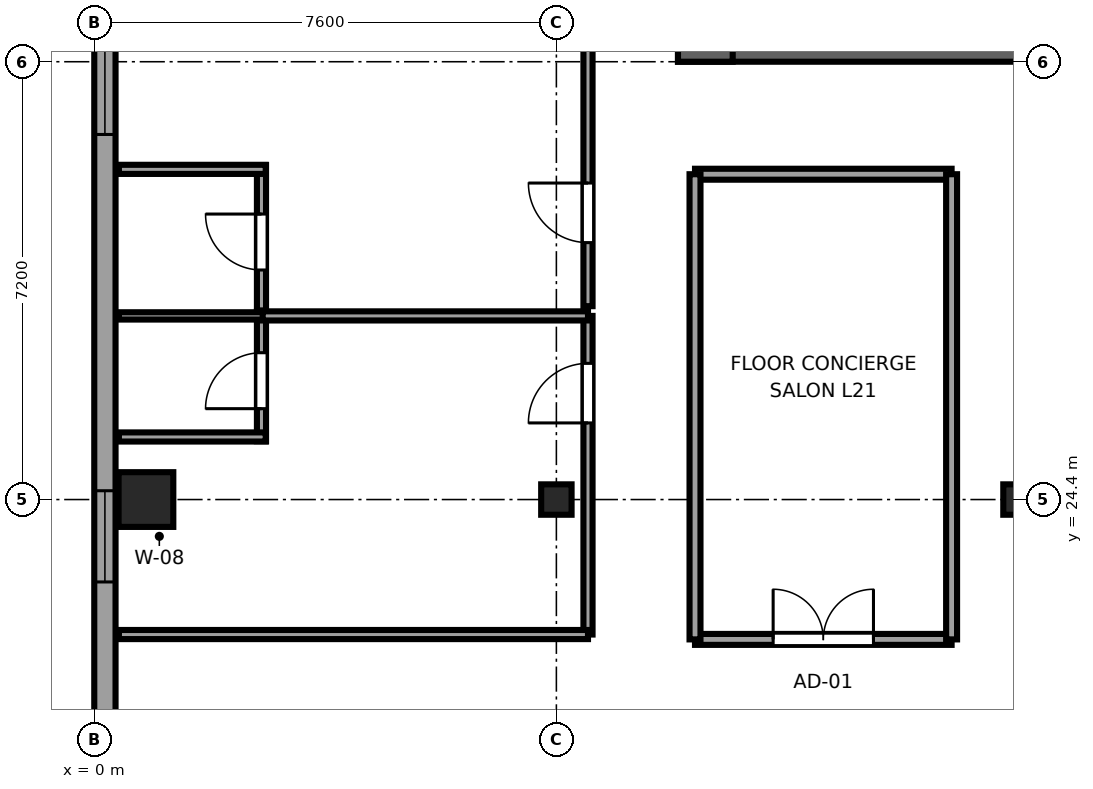
"""IFC4 building model, lengths in metres.
Left out: names, types, materials, properties, quantities, classifications, styles, units other than length and angle.
Written with IfcOpenShell. Run it as: python <this file> out.ifc"""

import sys

from ifc_helpers import new_model, si_unit, direction, frame, frame_2d, origin, origin_2d, place, context, subcontext, project, spatial, rectangle, i_section, extrude, source, transform, mapped, element, fill, save


model = new_model("IFC4")
c1 = context("Model", 3, precision=1e-05, world=origin(), true_north=direction((0.0, 1.0)))
c2 = subcontext(c1, "Body", "Model", "MODEL_VIEW")
j1 = project(units=[si_unit("LENGTHUNIT", "METRE"), si_unit("PLANEANGLEUNIT", "RADIAN")], contexts=[c1])
p1 = place(None, origin())
s1 = spatial("IfcSite", under=j1, at=p1, CompositionType="ELEMENT")
p2 = place(p1, origin())
s2 = spatial("IfcBuilding", under=s1, at=p2, CompositionType="ELEMENT")
p3 = place(p2, frame((0.0, 0.0, 85.25)))
s3 = spatial("IfcBuildingStorey", under=s2, at=p3, CompositionType="ELEMENT", Elevation=85.25)
p4 = place(p3, frame((9.6, 32.05, 0.0), z_axis=(0.0, 0.0, 1.0), x_axis=(1.0, 0.0, 0.0)))
e1 = element("IfcWall", 1, at=p4, inside=s3, PredefinedType="SHEAR", context=c2, shape_type="SweptSolid", body=[
    extrude(rectangle(XDim=26.8, YDim=0.9, at=frame_2d((13.4, 0.0))), origin(), (0.0, 0.0, 1.0), 3.55),
])
p5 = place(p4, frame((7.85, 0.0, 0.0), z_axis=(0.0, 0.0, 1.0), x_axis=(-1.0, 0.0, 0.0)))
e2 = element("IfcOpeningElement", 2, at=p5, cuts=e1, PredefinedType="OPENING", context=c2, shape_type="SweptSolid", body=[
    extrude(rectangle(XDim=1.5, YDim=2.04, at=frame_2d((0.75, 1.02))), frame((0.0, 0.46, 0.0), z_axis=(0.0, -1.0, 0.0), x_axis=(1.0, 0.0, 0.0)), (0.0, 0.0, 1.0), 0.92),
])
p6 = place(p4, frame((14.15, 0.0, 0.0), z_axis=(0.0, 0.0, 1.0), x_axis=(-1.0, 0.0, 0.0)))
e3 = element("IfcOpeningElement", 3, at=p6, cuts=e1, PredefinedType="OPENING", context=c2, shape_type="SweptSolid", body=[
    extrude(rectangle(XDim=1.5, YDim=2.04, at=frame_2d((0.75, 1.02))), frame((0.0, 0.46, 0.0), z_axis=(0.0, -1.0, 0.0), x_axis=(1.0, 0.0, 0.0)), (0.0, 0.0, 1.0), 0.92),
])
p7 = place(p4, frame((20.45, 0.0, 0.0), z_axis=(0.0, 0.0, 1.0), x_axis=(-1.0, 0.0, 0.0)))
e4 = element("IfcOpeningElement", 4, at=p7, cuts=e1, PredefinedType="OPENING", context=c2, shape_type="SweptSolid", body=[
    extrude(rectangle(XDim=1.5, YDim=2.04, at=frame_2d((0.75, 1.02))), frame((0.0, 0.46, 0.0), z_axis=(0.0, -1.0, 0.0), x_axis=(1.0, 0.0, 0.0)), (0.0, 0.0, 1.0), 0.92),
])
p8 = place(p3, frame((10.05, 31.6, 0.0), z_axis=(0.0, 0.0, 1.0), x_axis=(0.0, 1.0, 0.0)))
e5 = element("IfcWall", 5, at=p8, inside=s3, PredefinedType="SHEAR", context=c2, shape_type="SweptSolid", body=[
    extrude(rectangle(XDim=13.6, YDim=0.9, at=frame_2d((6.8, 0.0))), origin(), (0.0, 0.0, 1.0), 3.55),
])
m1 = source(origin(), c2, "Body", "SweptSolid", [
    extrude(rectangle(XDim=0.9, YDim=0.9, at=origin_2d()), origin(), (0.0, 0.0, 1.0), 3.55),
])
p9 = place(p3, frame((0.85, 24.4, 0.0), z_axis=(0.0, 0.0, 1.0), x_axis=(1.0, 0.0, 0.0)))
e6 = element("IfcColumn", 6, at=p9, inside=s3, PredefinedType="COLUMN", context=c2, shape_type="MappedRepresentation", body=[
    mapped(m1, transform((0.0, 0.0, 0.0), x_axis=(1.0, 0.0, 0.0), y_axis=(0.0, 1.0, 0.0), z_axis=(0.0, 0.0, 1.0), scale=1.0)),
])
m2 = source(origin(), c2, "Body", "SweptSolid", [
    extrude(i_section(OverallWidth=0.5, OverallDepth=0.5, WebThickness=0.022, FlangeThickness=0.034, at=origin_2d()), origin(), (0.0, 0.0, 1.0), 3.55),
])
for number, where, z_axis, x_axis in (
    (7, (7.6, 24.4, 0.0), (0.0, 0.0, 1.0), (1.0, 0.0, 0.0)),
    (8, (15.2, 24.4, 0.0), (0.0, 0.0, 1.0), (1.0, 0.0, 0.0)),
):
    element("IfcColumn", number, at=place(p3, frame(where, z_axis=z_axis, x_axis=x_axis)), inside=s3, PredefinedType="COLUMN", context=c2, shape_type="MappedRepresentation", body=[
        mapped(m2, transform((0.0, 0.0, 0.0), x_axis=(1.0, 0.0, 0.0), y_axis=(0.0, 1.0, 0.0), z_axis=(0.0, 0.0, 1.0), scale=1.0)),
    ])
p10 = place(p3, frame((0.175, 41.383, 0.0), z_axis=(0.0, 0.0, 1.0), x_axis=(0.0, -1.0, 0.0)))
e9 = element("IfcWall", 9, at=p10, inside=s3, PredefinedType="SOLIDWALL", context=c2, shape_type="SweptSolid", body=[
    extrude(rectangle(XDim=36.766, YDim=0.35, at=frame_2d((18.383, 0.0))), origin(), (0.0, 0.0, 1.0), 3.37),
])
p11 = place(p10, frame((1.526, 0.0, 0.68)))
e10 = element("IfcOpeningElement", 10, at=p11, cuts=e9, PredefinedType="OPENING", context=c2, shape_type="SweptSolid", body=[
    extrude(rectangle(XDim=2.1, YDim=1.9, at=frame_2d((1.05, 0.95))), frame((0.0, 0.185, 0.0), z_axis=(0.0, -1.0, 0.0), x_axis=(1.0, 0.0, 0.0)), (0.0, 0.0, 1.0), 0.37),
])
p12 = place(p10, frame((4.428, 0.0, 0.68)))
e11 = element("IfcOpeningElement", 11, at=p12, cuts=e9, PredefinedType="OPENING", context=c2, shape_type="SweptSolid", body=[
    extrude(rectangle(XDim=2.1, YDim=1.9, at=frame_2d((1.05, 0.95))), frame((0.0, 0.185, 0.0), z_axis=(0.0, -1.0, 0.0), x_axis=(1.0, 0.0, 0.0)), (0.0, 0.0, 1.0), 0.37),
])
p13 = place(p10, frame((8.879, 0.0, 0.68)))
e12 = element("IfcOpeningElement", 12, at=p13, cuts=e9, PredefinedType="OPENING", context=c2, shape_type="SweptSolid", body=[
    extrude(rectangle(XDim=2.1, YDim=1.9, at=frame_2d((1.05, 0.95))), frame((0.0, 0.185, 0.0), z_axis=(0.0, -1.0, 0.0), x_axis=(1.0, 0.0, 0.0)), (0.0, 0.0, 1.0), 0.37),
])
p14 = place(p10, frame((21.835, 0.0, 0.68)))
e13 = element("IfcOpeningElement", 13, at=p14, cuts=e9, PredefinedType="OPENING", context=c2, shape_type="SweptSolid", body=[
    extrude(rectangle(XDim=2.1, YDim=1.9, at=frame_2d((1.05, 0.95))), frame((0.0, 0.185, 0.0), z_axis=(0.0, -1.0, 0.0), x_axis=(1.0, 0.0, 0.0)), (0.0, 0.0, 1.0), 0.37),
])
p15 = place(p10, frame((26.286, 0.0, 0.68)))
e14 = element("IfcOpeningElement", 14, at=p15, cuts=e9, PredefinedType="OPENING", context=c2, shape_type="SweptSolid", body=[
    extrude(rectangle(XDim=2.1, YDim=1.9, at=frame_2d((1.05, 0.95))), frame((0.0, 0.185, 0.0), z_axis=(0.0, -1.0, 0.0), x_axis=(1.0, 0.0, 0.0)), (0.0, 0.0, 1.0), 0.37),
])
p16 = place(p10, frame((29.738, 0.0, 0.68)))
e15 = element("IfcOpeningElement", 15, at=p16, cuts=e9, PredefinedType="OPENING", context=c2, shape_type="SweptSolid", body=[
    extrude(rectangle(XDim=2.1, YDim=1.9, at=frame_2d((1.05, 0.95))), frame((0.0, 0.185, 0.0), z_axis=(0.0, -1.0, 0.0), x_axis=(1.0, 0.0, 0.0)), (0.0, 0.0, 1.0), 0.37),
])
p17 = place(p10, frame((34.079, 0.0, 0.62)))
e16 = element("IfcOpeningElement", 16, at=p17, cuts=e9, PredefinedType="OPENING", context=c2, shape_type="SweptSolid", body=[
    extrude(rectangle(XDim=1.5, YDim=1.55, at=frame_2d((0.75, 0.775))), frame((0.0, 0.185, 0.0), z_axis=(0.0, -1.0, 0.0), x_axis=(1.0, 0.0, 0.0)), (0.0, 0.0, 1.0), 0.37),
])
p18 = place(p10, frame((16.838, 0.0, 0.62)))
e17 = element("IfcOpeningElement", 17, at=p18, cuts=e9, PredefinedType="OPENING", context=c2, shape_type="SweptSolid", body=[
    extrude(rectangle(XDim=1.5, YDim=1.55, at=frame_2d((0.75, 0.775))), frame((0.0, 0.185, 0.0), z_axis=(0.0, -1.0, 0.0), x_axis=(1.0, 0.0, 0.0)), (0.0, 0.0, 1.0), 0.37),
])
p19 = place(p3, frame((2.75, 25.359, 0.0), z_axis=(0.0, 0.0, 1.0), x_axis=(0.0, 1.0, 0.0)))
e18 = element("IfcWall", 18, at=p19, inside=s3, PredefinedType="PARTITIONING", context=c2, shape_type="SweptSolid", body=[
    extrude(rectangle(XDim=2.131, YDim=0.15, at=frame_2d((1.065, 0.0))), origin(), (0.0, 0.0, 1.0), 3.37),
])
p20 = place(p19, frame((0.535, 0.0, 0.0)))
e19 = element("IfcOpeningElement", 19, at=p20, cuts=e18, PredefinedType="OPENING", context=c2, shape_type="SweptSolid", body=[
    extrude(rectangle(XDim=0.92, YDim=2.01, at=frame_2d((0.46, 1.005))), frame((0.0, 0.085, 0.0), z_axis=(0.0, -1.0, 0.0), x_axis=(1.0, 0.0, 0.0)), (0.0, 0.0, 1.0), 0.17),
])
p21 = place(p3, frame((0.405, 25.429, 0.0), z_axis=(0.0, 0.0, 1.0), x_axis=(1.0, 0.0, 0.0)))
e20 = element("IfcWall", 20, at=p21, inside=s3, PredefinedType="PARTITIONING", context=c2, shape_type="SweptSolid", body=[
    extrude(rectangle(XDim=2.415, YDim=0.15, at=frame_2d((1.208, 0.0))), origin(), (0.0, 0.0, 1.0), 3.37),
])
p22 = place(p3, frame((0.405, 27.42, 0.0), z_axis=(0.0, 0.0, 1.0), x_axis=(1.0, 0.0, 0.0)))
e21 = element("IfcWall", 21, at=p22, inside=s3, PredefinedType="PLUMBINGWALL", context=c2, shape_type="SweptSolid", body=[
    extrude(rectangle(XDim=2.415, YDim=0.12, at=frame_2d((1.208, 0.0))), origin(), (0.0, 0.0, 1.0), 3.37),
])
p23 = place(p3, frame((2.75, 27.51, 0.0), z_axis=(0.0, 0.0, 1.0), x_axis=(0.0, 1.0, 0.0)))
e22 = element("IfcWall", 22, at=p23, inside=s3, PredefinedType="PARTITIONING", context=c2, shape_type="SweptSolid", body=[
    extrude(rectangle(XDim=2.39, YDim=0.15, at=frame_2d((1.195, 0.0))), origin(), (0.0, 0.0, 1.0), 3.37),
])
p24 = place(p23, frame((0.665, 0.0, 0.0)))
e23 = element("IfcOpeningElement", 23, at=p24, cuts=e22, PredefinedType="OPENING", context=c2, shape_type="SweptSolid", body=[
    extrude(rectangle(XDim=0.92, YDim=2.01, at=frame_2d((0.46, 1.005))), frame((0.0, 0.085, 0.0), z_axis=(0.0, -1.0, 0.0), x_axis=(1.0, 0.0, 0.0)), (0.0, 0.0, 1.0), 0.17),
])
p25 = place(p3, frame((0.405, 29.83, 0.0), z_axis=(0.0, 0.0, 1.0), x_axis=(1.0, 0.0, 0.0)))
e24 = element("IfcWall", 24, at=p25, inside=s3, PredefinedType="PARTITIONING", context=c2, shape_type="SweptSolid", body=[
    extrude(rectangle(XDim=2.415, YDim=0.15, at=frame_2d((1.208, 0.0))), origin(), (0.0, 0.0, 1.0), 3.37),
])
p26 = place(p3, frame((8.12, 22.18, 0.0), z_axis=(0.0, 0.0, 1.0), x_axis=(0.0, 1.0, 0.0)))
e25 = element("IfcWall", 25, at=p26, inside=s3, PredefinedType="PARTITIONING", context=c2, shape_type="SweptSolid", body=[
    extrude(rectangle(XDim=5.24, YDim=0.15, at=frame_2d((2.62, 0.0))), origin(), (0.0, 0.0, 1.0), 3.37),
])
p27 = place(p26, frame((3.48, 0.0, 0.0)))
e26 = element("IfcOpeningElement", 26, at=p27, cuts=e25, PredefinedType="OPENING", context=c2, shape_type="SweptSolid", body=[
    extrude(rectangle(XDim=0.98, YDim=2.12, at=frame_2d((0.49, 1.06))), frame((0.0, 0.085, 0.0), z_axis=(0.0, -1.0, 0.0), x_axis=(1.0, 0.0, 0.0)), (0.0, 0.0, 1.0), 0.17),
])
p28 = place(p3, frame((0.405, 22.18, 0.0), z_axis=(0.0, 0.0, 1.0), x_axis=(1.0, 0.0, 0.0)))
e27 = element("IfcWall", 27, at=p28, inside=s3, PredefinedType="PARTITIONING", context=c2, shape_type="SweptSolid", body=[
    extrude(rectangle(XDim=7.715, YDim=0.15, at=frame_2d((3.857, 0.0))), origin(), (0.0, 0.0, 1.0), 3.37),
])
p29 = place(p3, frame((2.77, 27.42, 0.0), z_axis=(0.0, 0.0, 1.0), x_axis=(1.0, 0.0, 0.0)))
e28 = element("IfcWall", 28, at=p29, inside=s3, PredefinedType="PARTITIONING", context=c2, shape_type="SweptSolid", body=[
    extrude(rectangle(XDim=5.35, YDim=0.15, at=frame_2d((2.675, 0.0))), origin(), (0.0, 0.0, 1.0), 3.37),
])
p30 = place(p3, frame((8.12, 27.58, 0.0), z_axis=(0.0, 0.0, 1.0), x_axis=(0.0, 1.0, 0.0)))
e29 = element("IfcWall", 29, at=p30, inside=s3, PredefinedType="PARTITIONING", context=c2, shape_type="SweptSolid", body=[
    extrude(rectangle(XDim=18.015, YDim=0.15, at=frame_2d((9.007, 0.0))), origin(), (0.0, 0.0, 1.0), 3.37),
])
p31 = place(p30, frame((1.045, 0.0, 0.0)))
e30 = element("IfcOpeningElement", 30, at=p31, cuts=e29, PredefinedType="OPENING", context=c2, shape_type="SweptSolid", body=[
    extrude(rectangle(XDim=0.98, YDim=2.12, at=frame_2d((0.49, 1.06))), frame((0.0, 0.085, 0.0), z_axis=(0.0, -1.0, 0.0), x_axis=(1.0, 0.0, 0.0)), (0.0, 0.0, 1.0), 0.17),
])
p32 = place(p3, frame((9.88, 22.1, 0.0), z_axis=(0.0, 0.0, 1.0), x_axis=(1.0, 0.0, 0.0)))
e31 = element("IfcWall", 31, at=p32, inside=s3, PredefinedType="PARTITIONING", context=c2, shape_type="SweptSolid", body=[
    extrude(rectangle(XDim=4.22, YDim=0.18, at=frame_2d((2.11, 0.0))), origin(), (0.0, 0.0, 1.0), 3.37),
])
p33 = place(p32, frame((1.285, 0.0, 0.0)))
e32 = element("IfcOpeningElement", 32, at=p33, cuts=e31, PredefinedType="OPENING", context=c2, shape_type="SweptSolid", body=[
    extrude(rectangle(XDim=1.65, YDim=2.15, at=frame_2d((0.825, 1.075))), frame((0.0, 0.1, 0.0), z_axis=(0.0, -1.0, 0.0), x_axis=(1.0, 0.0, 0.0)), (0.0, 0.0, 1.0), 0.2),
])
p34 = place(p3, frame((9.88, 29.75, 0.0), z_axis=(0.0, 0.0, 1.0), x_axis=(1.0, 0.0, 0.0)))
e33 = element("IfcWall", 33, at=p34, inside=s3, PredefinedType="PARTITIONING", context=c2, shape_type="SweptSolid", body=[
    extrude(rectangle(XDim=4.22, YDim=0.18, at=frame_2d((2.11, 0.0))), origin(), (0.0, 0.0, 1.0), 3.37),
])
for number, where, z_axis, x_axis in (
    (34, (9.88, 22.1, 0.0), (0.0, 0.0, 1.0), (0.0, 1.0, 0.0)),
    (35, (14.1, 22.1, 0.0), (0.0, 0.0, 1.0), (0.0, 1.0, 0.0)),
):
    element("IfcWall", number, at=place(p3, frame(where, z_axis=z_axis, x_axis=x_axis)), inside=s3, PredefinedType="PARTITIONING", context=c2, shape_type="SweptSolid", body=[
        extrude(rectangle(XDim=7.65, YDim=0.18, at=frame_2d((3.825, 0.0))), origin(), (0.0, 0.0, 1.0), 3.37),
    ])
m3 = source(origin(), c2, "Body", "SweptSolid", [
    extrude(rectangle(XDim=2.1, YDim=1.9, at=frame_2d((1.05, 0.95))), frame((0.0, 0.09, 0.0), z_axis=(0.0, -1.0, 0.0), x_axis=(1.0, 0.0, 0.0)), (0.0, 0.0, 1.0), 0.06),
])
p35 = place(p13, origin())
e36 = element("IfcWindow", 36, at=p35, inside=s3, PartitioningType="TRIPLE_PANEL_HORIZONTAL", PredefinedType="WINDOW", context=c2, shape_type="MappedRepresentation", body=[
    mapped(m3, transform((0.0, 0.0, 0.0), x_axis=(1.0, 0.0, 0.0), y_axis=(0.0, 1.0, 0.0), z_axis=(0.0, 0.0, 1.0), scale=1.0)),
])
fill(e12, e36)
m4 = source(origin(), c2, "Body", "SweptSolid", [
    extrude(rectangle(XDim=1.5, YDim=1.55, at=frame_2d((0.75, 0.775))), frame((0.0, 0.09, 0.0), z_axis=(0.0, -1.0, 0.0), x_axis=(1.0, 0.0, 0.0)), (0.0, 0.0, 1.0), 0.06),
])
p36 = place(p18, origin())
e37 = element("IfcWindow", 37, at=p36, inside=s3, PartitioningType="SINGLE_PANEL", PredefinedType="WINDOW", context=c2, shape_type="MappedRepresentation", body=[
    mapped(m4, transform((0.0, 0.0, 0.0), x_axis=(1.0, 0.0, 0.0), y_axis=(0.0, 1.0, 0.0), z_axis=(0.0, 0.0, 1.0), scale=1.0)),
])
fill(e17, e37)
m5 = source(origin(), c2, "Body", "SweptSolid", [
    extrude(rectangle(XDim=0.92, YDim=2.01, at=frame_2d((0.46, 1.005))), frame((0.0, 0.025, 0.0), z_axis=(0.0, -1.0, 0.0), x_axis=(1.0, 0.0, 0.0)), (0.0, 0.0, 1.0), 0.05),
])
p37 = place(p20, origin())
e38 = element("IfcDoor", 38, at=p37, inside=s3, OperationType="SINGLE_SWING_LEFT", PredefinedType="DOOR", context=c2, shape_type="MappedRepresentation", body=[
    mapped(m5, transform((0.0, 0.0, 0.0), x_axis=(1.0, 0.0, 0.0), y_axis=(0.0, 1.0, 0.0), z_axis=(0.0, 0.0, 1.0), scale=1.0)),
])
fill(e19, e38)
p38 = place(p24, origin())
e39 = element("IfcDoor", 39, at=p38, inside=s3, OperationType="SINGLE_SWING_RIGHT", PredefinedType="DOOR", context=c2, shape_type="MappedRepresentation", body=[
    mapped(m5, transform((0.0, 0.0, 0.0), x_axis=(1.0, 0.0, 0.0), y_axis=(0.0, 1.0, 0.0), z_axis=(0.0, 0.0, 1.0), scale=1.0)),
])
fill(e23, e39)
m6 = source(origin(), c2, "Body", "SweptSolid", [
    extrude(rectangle(XDim=0.98, YDim=2.12, at=frame_2d((0.49, 1.06))), frame((0.0, 0.025, 0.0), z_axis=(0.0, -1.0, 0.0), x_axis=(1.0, 0.0, 0.0)), (0.0, 0.0, 1.0), 0.05),
])
p39 = place(p27, origin())
e40 = element("IfcDoor", 40, at=p39, inside=s3, OperationType="SINGLE_SWING_LEFT", PredefinedType="DOOR", context=c2, shape_type="MappedRepresentation", body=[
    mapped(m6, transform((0.0, 0.0, 0.0), x_axis=(1.0, 0.0, 0.0), y_axis=(0.0, 1.0, 0.0), z_axis=(0.0, 0.0, 1.0), scale=1.0)),
])
fill(e26, e40)
p40 = place(p31, origin())
e41 = element("IfcDoor", 41, at=p40, inside=s3, OperationType="SINGLE_SWING_RIGHT", PredefinedType="DOOR", context=c2, shape_type="MappedRepresentation", body=[
    mapped(m6, transform((0.0, 0.0, 0.0), x_axis=(1.0, 0.0, 0.0), y_axis=(0.0, 1.0, 0.0), z_axis=(0.0, 0.0, 1.0), scale=1.0)),
])
fill(e30, e41)
m7 = source(origin(), c2, "Body", "SweptSolid", [
    extrude(rectangle(XDim=1.65, YDim=2.15, at=frame_2d((0.825, 1.075))), frame((0.0, 0.025, 0.0), z_axis=(0.0, -1.0, 0.0), x_axis=(1.0, 0.0, 0.0)), (0.0, 0.0, 1.0), 0.05),
])
p41 = place(p33, origin())
e42 = element("IfcDoor", 42, at=p41, inside=s3, OperationType="DOUBLE_DOOR_SINGLE_SWING", PredefinedType="DOOR", context=c2, shape_type="MappedRepresentation", body=[
    mapped(m7, transform((0.0, 0.0, 0.0), x_axis=(1.0, 0.0, 0.0), y_axis=(0.0, 1.0, 0.0), z_axis=(0.0, 0.0, 1.0), scale=1.0)),
])
fill(e32, e42)
save(model, sys.argv[1])
